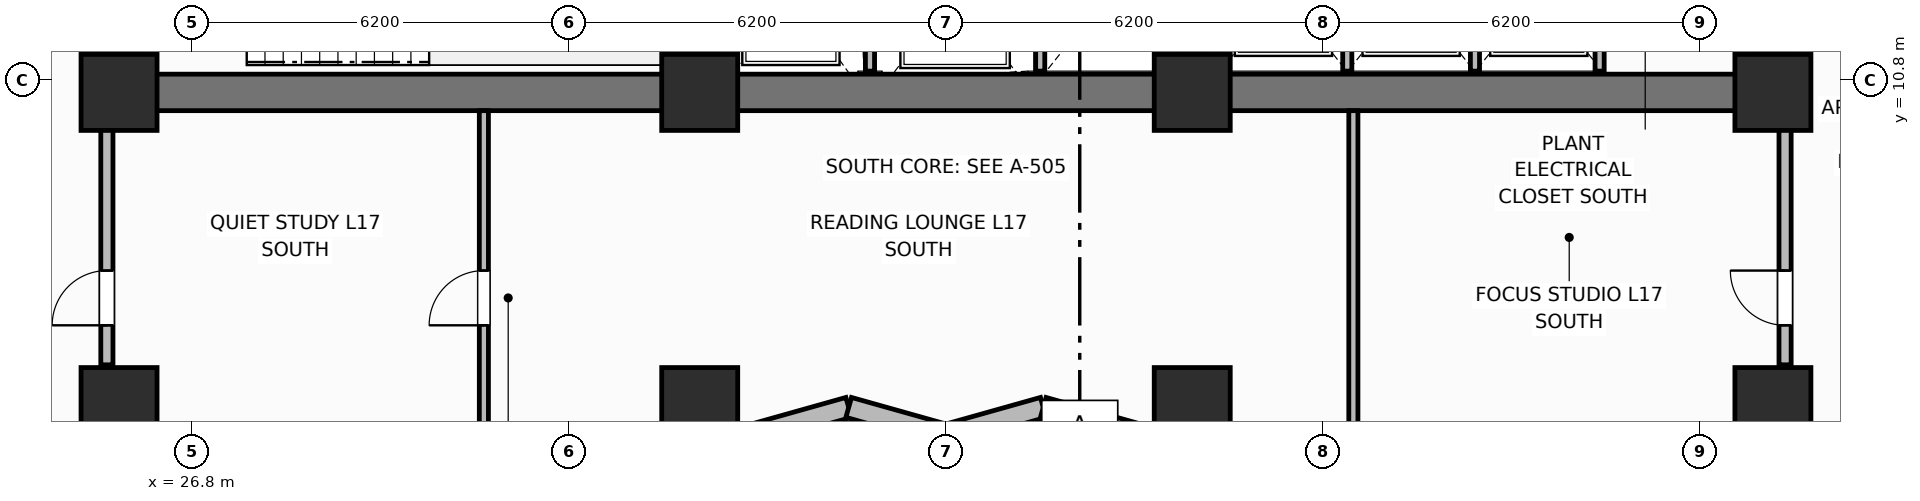
"""IFC4 building model, lengths in metres.
Left out: names, types, materials, properties, quantities, classifications, styles, units other than length and angle.
Written with IfcOpenShell. Run it as: python <this file> out.ifc"""

import sys

from ifc_helpers import new_model, si_unit, direction, frame, frame_2d, origin, origin_2d, place, context, subcontext, project, spatial, rectangle, extrude, element, fill, save


model = new_model("IFC4")
c1 = context("Model", 3, precision=1e-05, world=origin(), true_north=direction((0.0, 1.0)))
c2 = subcontext(c1, "Body", "Model", "MODEL_VIEW")
j1 = project(units=[si_unit("LENGTHUNIT", "METRE"), si_unit("PLANEANGLEUNIT", "RADIAN")], contexts=[c1])
p1 = place(None, origin())
s1 = spatial("IfcSite", under=j1, at=p1, CompositionType="ELEMENT")
p2 = place(p1, origin())
s2 = spatial("IfcBuilding", under=s1, at=p2, CompositionType="ELEMENT")
p3 = place(p2, frame((0.0, 0.0, 69.5)))
s3 = spatial("IfcBuildingStorey", under=s2, at=p3, CompositionType="ELEMENT", Elevation=69.5)
p4 = place(p3, frame((52.8, 10.6, 0.0), z_axis=(0.0, 0.0, 1.0), x_axis=(-1.0, 0.0, 0.0)))
e1 = element("IfcWall", 1, at=p4, inside=s3, PredefinedType="SHEAR", context=c2, shape_type="SweptSolid", body=[
    extrude(rectangle(XDim=27.2, YDim=0.6, at=frame_2d((13.6, 0.0))), origin(), (0.0, 0.0, 1.0), 3.7),
])
for number, where, z_axis, x_axis in (
    (2, (25.6, 10.9, 0.0), (0.0, 0.0, 1.0), (0.0, 1.0, 0.0)),
    (3, (52.8, 10.9, 0.0), (0.0, 0.0, 1.0), (0.0, 1.0, 0.0)),
):
    element("IfcWall", number, at=place(p3, frame(where, z_axis=z_axis, x_axis=x_axis)), inside=s3, PredefinedType="SHEAR", context=c2, shape_type="SweptSolid", body=[
        extrude(rectangle(XDim=5.6, YDim=0.6, at=frame_2d((2.8, 0.0))), origin(), (0.0, 0.0, 1.0), 3.7),
    ])
for number, where, z_axis, x_axis in (
    (4, (35.15, 10.9, 0.0), (0.0, 0.0, 1.0), (0.0, 1.0, 0.0)),
    (5, (43.25, 10.9, 0.0), (0.0, 0.0, 1.0), (0.0, 1.0, 0.0)),
):
    element("IfcWall", number, at=place(p3, frame(where, z_axis=z_axis, x_axis=x_axis)), inside=s3, PredefinedType="SHEAR", context=c2, shape_type="SweptSolid", body=[
        extrude(rectangle(XDim=5.6, YDim=0.4, at=frame_2d((2.8, 0.0))), origin(), (0.0, 0.0, 1.0), 3.7),
    ])
for number, where, z_axis, x_axis in (
    (6, (25.6, 10.6, 0.0), (0.0, 0.0, 1.0), (1.0, 0.0, 0.0)),
    (7, (35.15, 10.6, 0.0), (0.0, 0.0, 1.0), (1.0, 0.0, 0.0)),
    (8, (43.25, 10.6, 0.0), (0.0, 0.0, 1.0), (1.0, 0.0, 0.0)),
    (9, (52.8, 10.6, 0.0), (0.0, 0.0, 1.0), (1.0, 0.0, 0.0)),
    (10, (25.6, 5.45, 0.0), (0.0, 0.0, 1.0), (1.0, 0.0, 0.0)),
    (11, (35.15, 5.45, 0.0), (0.0, 0.0, 1.0), (1.0, 0.0, 0.0)),
    (12, (43.25, 5.45, 0.0), (0.0, 0.0, 1.0), (1.0, 0.0, 0.0)),
    (13, (52.8, 5.45, 0.0), (0.0, 0.0, 1.0), (1.0, 0.0, 0.0)),
):
    element("IfcColumn", number, at=place(p3, frame(where, z_axis=z_axis, x_axis=x_axis)), inside=s3, PredefinedType="COLUMN", context=c2, shape_type="SweptSolid", body=[
        extrude(rectangle(XDim=1.25, YDim=1.25, at=origin_2d()), origin(), (0.0, 0.0, 1.0), 3.7),
    ])
p5 = place(p3, frame((36.0, 4.97, 0.0), z_axis=(0.0, 0.0, 1.0), x_axis=(0.962662902433, 0.270703040766, 0.0)))
e14 = element("IfcWall", 14, at=p5, inside=s3, PredefinedType="SOLIDWALL", context=c2, shape_type="SweptSolid", body=[
    extrude(rectangle(XDim=1.662, YDim=0.34, at=frame_2d((0.831, 0.0))), origin(), (0.0, 0.0, 1.0), 2.7),
])
p6 = place(p3, frame((37.6, 5.42, 0.0), z_axis=(0.0, 0.0, 1.0), x_axis=(0.962652136636, -0.270741322725, 0.0)))
e15 = element("IfcWall", 15, at=p6, inside=s3, PredefinedType="SOLIDWALL", context=c2, shape_type="SweptSolid", body=[
    extrude(rectangle(XDim=1.662, YDim=0.34, at=frame_2d((0.831, 0.0))), origin(), (0.0, 0.0, 1.0), 2.7),
])
p7 = place(p3, frame((39.2, 4.97, 0.0), z_axis=(0.0, 0.0, 1.0), x_axis=(0.962662902433, 0.270703040766, 0.0)))
e16 = element("IfcWall", 16, at=p7, inside=s3, PredefinedType="SOLIDWALL", context=c2, shape_type="SweptSolid", body=[
    extrude(rectangle(XDim=1.662, YDim=0.34, at=frame_2d((0.831, 0.0))), origin(), (0.0, 0.0, 1.0), 2.7),
])
p8 = place(p3, frame((40.8, 5.42, 0.0), z_axis=(0.0, 0.0, 1.0), x_axis=(0.962652136636, -0.270741322725, 0.0)))
e17 = element("IfcWall", 17, at=p8, inside=s3, PredefinedType="SOLIDWALL", context=c2, shape_type="SweptSolid", body=[
    extrude(rectangle(XDim=1.662, YDim=0.34, at=frame_2d((0.831, 0.0))), origin(), (0.0, 0.0, 1.0), 2.7),
])
for number, where, z_axis, x_axis in (
    (18, (37.95, 10.95, 0.0), (0.0, 0.0, 1.0), (0.0, 1.0, 0.0)),
    (19, (40.75, 10.95, 0.0), (0.0, 0.0, 1.0), (0.0, 1.0, 0.0)),
):
    element("IfcWall", number, at=place(p3, frame(where, z_axis=z_axis, x_axis=x_axis)), inside=s3, PredefinedType="PARTITIONING", context=c2, shape_type="SweptSolid", body=[
        extrude(rectangle(XDim=2.75, YDim=0.15, at=frame_2d((1.375, 0.0))), origin(), (0.0, 0.0, 1.0), 2.53),
    ])
for number, where, z_axis, x_axis in (
    (20, (45.8, 10.95, 0.0), (0.0, 0.0, 1.0), (0.0, 1.0, 0.0)),
    (21, (47.9, 10.95, 0.0), (0.0, 0.0, 1.0), (0.0, 1.0, 0.0)),
    (22, (49.95, 10.95, 0.0), (0.0, 0.0, 1.0), (0.0, 1.0, 0.0)),
):
    element("IfcWall", number, at=place(p3, frame(where, z_axis=z_axis, x_axis=x_axis)), inside=s3, PredefinedType="PARTITIONING", context=c2, shape_type="SweptSolid", body=[
        extrude(rectangle(XDim=2.7, YDim=0.15, at=frame_2d((1.35, 0.0))), origin(), (0.0, 0.0, 1.0), 2.53),
    ])
p9 = place(p3, frame((31.6, 4.97, 0.0), z_axis=(0.0, 0.0, 1.0), x_axis=(0.0, 1.0, 0.0)))
e23 = element("IfcWall", 23, at=p9, inside=s3, PredefinedType="PARTITIONING", context=c2, shape_type="SweptSolid", body=[
    extrude(rectangle(XDim=5.33, YDim=0.15, at=frame_2d((2.665, 0.0))), origin(), (0.0, 0.0, 1.0), 2.53),
])
p10 = place(p9, frame((1.8, 0.0, 0.0)))
e24 = element("IfcOpeningElement", 24, at=p10, cuts=e23, PredefinedType="OPENING", context=c2, shape_type="SweptSolid", body=[
    extrude(rectangle(XDim=0.9, YDim=2.1, at=frame_2d((0.45, 1.05))), frame((0.0, 0.085, 0.0), z_axis=(0.0, -1.0, 0.0), x_axis=(1.0, 0.0, 0.0)), (0.0, 0.0, 1.0), 0.17),
])
p11 = place(p3, frame((45.9, 4.97, 0.0), z_axis=(0.0, 0.0, 1.0), x_axis=(0.0, 1.0, 0.0)))
e25 = element("IfcWall", 25, at=p11, inside=s3, PredefinedType="PARTITIONING", context=c2, shape_type="SweptSolid", body=[
    extrude(rectangle(XDim=5.33, YDim=0.15, at=frame_2d((2.665, 0.0))), origin(), (0.0, 0.0, 1.0), 2.53),
])
p12 = place(p3, frame((25.4, 6.12, 0.0), z_axis=(0.0, 0.0, 1.0), x_axis=(0.0, 1.0, 0.0)))
e26 = element("IfcWall", 26, at=p12, inside=s3, PredefinedType="PARTITIONING", context=c2, shape_type="SweptSolid", body=[
    extrude(rectangle(XDim=4.18, YDim=0.2, at=frame_2d((2.09, 0.0))), origin(), (0.0, 0.0, 1.0), 2.53),
])
p13 = place(p12, frame((0.65, 0.0, 0.0)))
e27 = element("IfcOpeningElement", 27, at=p13, cuts=e26, PredefinedType="OPENING", context=c2, shape_type="SweptSolid", body=[
    extrude(rectangle(XDim=0.9, YDim=2.1, at=frame_2d((0.45, 1.05))), frame((0.0, 0.11, 0.0), z_axis=(0.0, -1.0, 0.0), x_axis=(1.0, 0.0, 0.0)), (0.0, 0.0, 1.0), 0.22),
])
p14 = place(p3, frame((53.0, 6.12, 0.0), z_axis=(0.0, 0.0, 1.0), x_axis=(0.0, 1.0, 0.0)))
e28 = element("IfcWall", 28, at=p14, inside=s3, PredefinedType="PARTITIONING", context=c2, shape_type="SweptSolid", body=[
    extrude(rectangle(XDim=4.18, YDim=0.2, at=frame_2d((2.09, 0.0))), origin(), (0.0, 0.0, 1.0), 2.53),
])
p15 = place(p14, frame((0.65, 0.0, 0.0)))
e29 = element("IfcOpeningElement", 29, at=p15, cuts=e28, PredefinedType="OPENING", context=c2, shape_type="SweptSolid", body=[
    extrude(rectangle(XDim=0.9, YDim=2.1, at=frame_2d((0.45, 1.05))), frame((0.0, 0.11, 0.0), z_axis=(0.0, -1.0, 0.0), x_axis=(1.0, 0.0, 0.0)), (0.0, 0.0, 1.0), 0.22),
])
p16 = place(p10, origin())
e30 = element("IfcDoor", 30, at=p16, inside=s3, OperationType="SINGLE_SWING_LEFT", PredefinedType="DOOR", context=c2, shape_type="SweptSolid", body=[
    extrude(rectangle(XDim=0.9, YDim=2.1, at=frame_2d((0.45, 1.05))), frame((0.0, 0.025, 0.0), z_axis=(0.0, -1.0, 0.0), x_axis=(1.0, 0.0, 0.0)), (0.0, 0.0, 1.0), 0.05),
])
fill(e24, e30)
p17 = place(p13, origin())
e31 = element("IfcDoor", 31, at=p17, inside=s3, OperationType="SINGLE_SWING_LEFT", PredefinedType="DOOR", context=c2, shape_type="SweptSolid", body=[
    extrude(rectangle(XDim=0.9, YDim=2.1, at=frame_2d((0.45, 1.05))), frame((0.0, 0.025, 0.0), z_axis=(0.0, -1.0, 0.0), x_axis=(1.0, 0.0, 0.0)), (0.0, 0.0, 1.0), 0.05),
])
fill(e27, e31)
p18 = place(p15, origin())
e32 = element("IfcDoor", 32, at=p18, inside=s3, OperationType="SINGLE_SWING_RIGHT", PredefinedType="DOOR", context=c2, shape_type="SweptSolid", body=[
    extrude(rectangle(XDim=0.9, YDim=2.1, at=frame_2d((0.45, 1.05))), frame((0.0, 0.025, 0.0), z_axis=(0.0, -1.0, 0.0), x_axis=(1.0, 0.0, 0.0)), (0.0, 0.0, 1.0), 0.05),
])
fill(e29, e32)
save(model, sys.argv[1])
